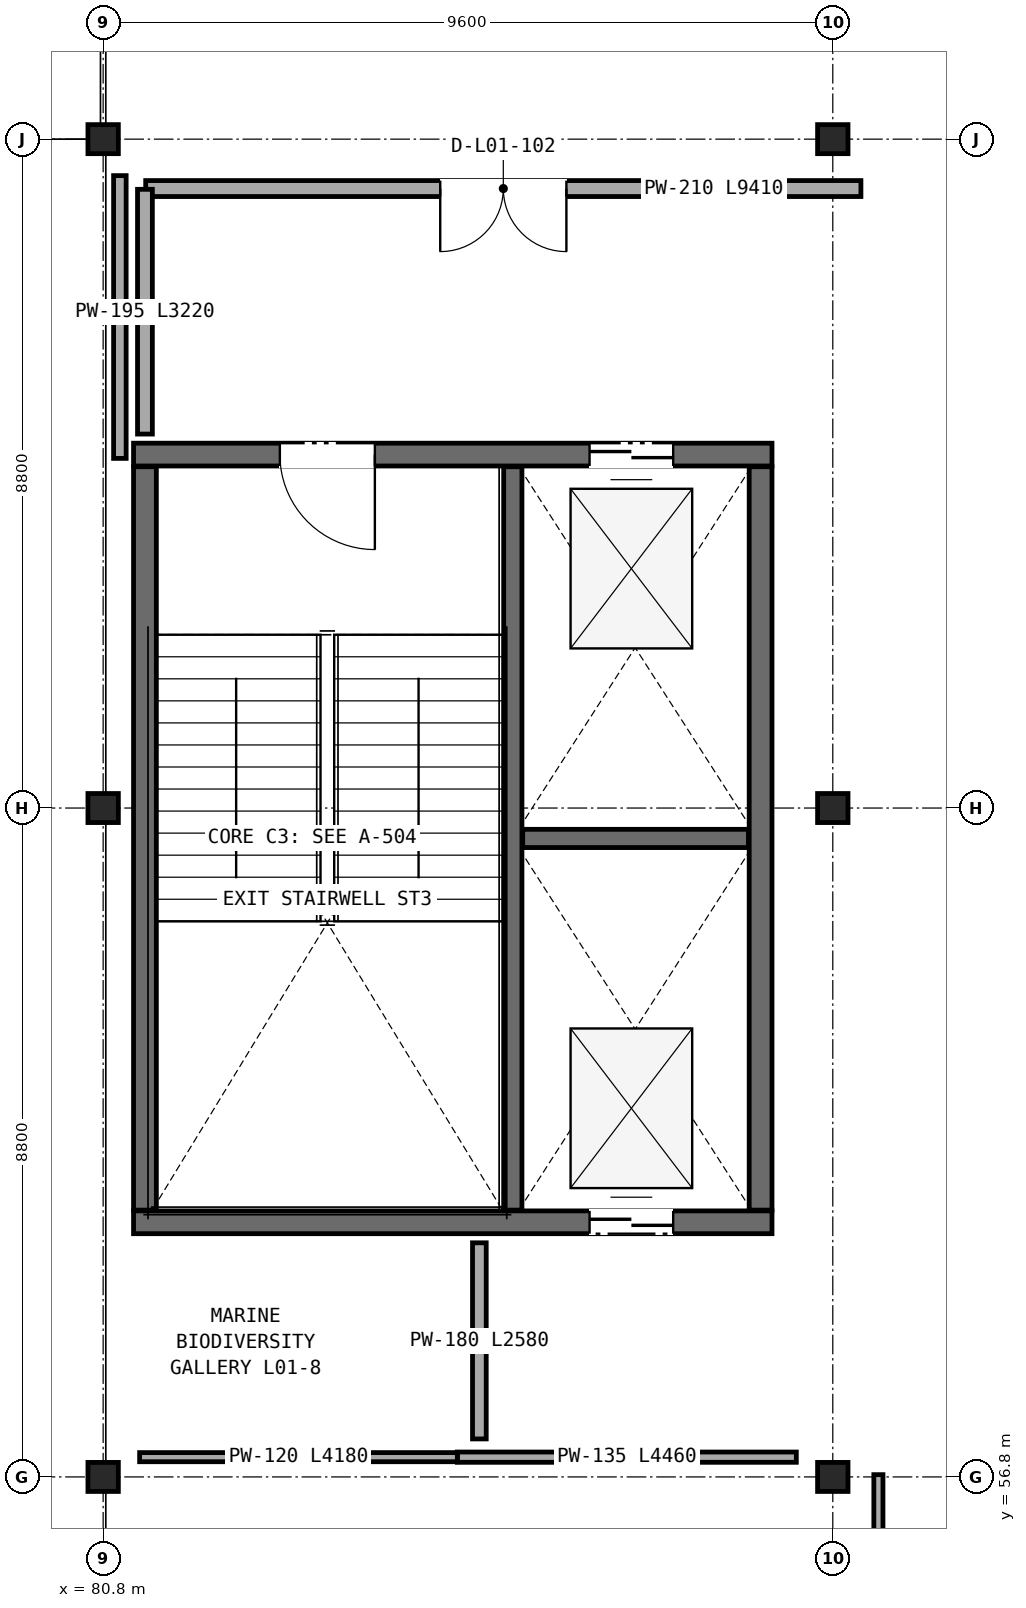
"""IFC4 building model, lengths in metres.
Left out: names, types, materials, properties, quantities, classifications, styles, units other than length and angle.
Written with IfcOpenShell. Run it as: python <this file> out.ifc"""

import sys

from ifc_helpers import new_model, si_unit, direction, frame, frame_2d, origin, origin_2d, place, context, subcontext, project, spatial, rectangle, i_section, extrude, element, fill, save


model = new_model("IFC4")
c1 = context("Model", 3, precision=1e-05, world=origin(), true_north=direction((0.0, 1.0)))
c2 = subcontext(c1, "Body", "Model", "MODEL_VIEW")
j1 = project(units=[si_unit("LENGTHUNIT", "METRE"), si_unit("PLANEANGLEUNIT", "RADIAN")], contexts=[c1])
p1 = place(None, origin())
s1 = spatial("IfcSite", under=j1, at=p1, CompositionType="ELEMENT")
p2 = place(p1, origin())
s2 = spatial("IfcBuilding", under=s1, at=p2, CompositionType="ELEMENT")
p3 = place(p2, frame((0.0, 0.0, 5.6)))
s3 = spatial("IfcBuildingStorey", under=s2, at=p3, CompositionType="ELEMENT", Elevation=5.6)
for number, where, z_axis, x_axis in (
    (1, (90.4, 56.8, 0.0), (0.0, 0.0, 1.0), (1.0, 0.0, 0.0)),
    (2, (90.4, 65.6, 0.0), (0.0, 0.0, 1.0), (1.0, 0.0, 0.0)),
    (3, (90.4, 74.4, 0.0), (0.0, 0.0, 1.0), (1.0, 0.0, 0.0)),
    (4, (80.8, 56.8, 0.0), (0.0, 0.0, 1.0), (1.0, 0.0, 0.0)),
    (5, (80.8, 65.6, 0.0), (0.0, 0.0, 1.0), (1.0, 0.0, 0.0)),
    (6, (80.8, 74.4, 0.0), (0.0, 0.0, 1.0), (1.0, 0.0, 0.0)),
):
    element("IfcColumn", number, at=place(p3, frame(where, z_axis=z_axis, x_axis=x_axis)), inside=s3, PredefinedType="COLUMN", context=c2, shape_type="SweptSolid", body=[
        extrude(i_section(OverallWidth=0.4, OverallDepth=0.382, WebThickness=0.025, FlangeThickness=0.036, at=origin_2d()), origin(), (0.0, 0.0, 1.0), 4.5),
    ])
p4 = place(p3, frame((81.2, 60.15, 0.0), z_axis=(0.0, 0.0, 1.0), x_axis=(1.0, 0.0, 0.0)))
e7 = element("IfcWall", 7, at=p4, inside=s3, PredefinedType="SHEAR", context=c2, shape_type="SweptSolid", body=[
    extrude(rectangle(XDim=8.4, YDim=0.3, at=frame_2d((4.2, 0.0))), origin(), (0.0, 0.0, 1.0), 4.245),
])
p5 = place(p4, frame((6.0, 0.0, 0.0)))
e8 = element("IfcOpeningElement", 8, at=p5, cuts=e7, PredefinedType="OPENING", context=c2, shape_type="SweptSolid", body=[
    extrude(rectangle(XDim=1.1, YDim=2.2, at=frame_2d((0.55, 1.1))), frame((0.0, 0.16, 0.0), z_axis=(0.0, -1.0, 0.0), x_axis=(1.0, 0.0, 0.0)), (0.0, 0.0, 1.0), 0.32),
])
p6 = place(p3, frame((89.6, 70.25, 0.0), z_axis=(0.0, 0.0, 1.0), x_axis=(-1.0, 0.0, 0.0)))
e9 = element("IfcWall", 9, at=p6, inside=s3, PredefinedType="SHEAR", context=c2, shape_type="SweptSolid", body=[
    extrude(rectangle(XDim=8.4, YDim=0.3, at=frame_2d((4.2, 0.0))), origin(), (0.0, 0.0, 1.0), 4.245),
])
p7 = place(p6, frame((5.225, 0.0, 0.0)))
e10 = element("IfcOpeningElement", 10, at=p7, cuts=e9, PredefinedType="OPENING", context=c2, shape_type="SweptSolid", body=[
    extrude(rectangle(XDim=1.25, YDim=2.2, at=frame_2d((0.625, 1.1))), frame((0.0, 0.16, 0.0), z_axis=(0.0, -1.0, 0.0), x_axis=(1.0, 0.0, 0.0)), (0.0, 0.0, 1.0), 0.32),
])
p8 = place(p6, frame((1.3, 0.0, 0.0)))
e11 = element("IfcOpeningElement", 11, at=p8, cuts=e9, PredefinedType="OPENING", context=c2, shape_type="SweptSolid", body=[
    extrude(rectangle(XDim=1.1, YDim=2.2, at=frame_2d((0.55, 1.1))), frame((0.0, 0.16, 0.0), z_axis=(0.0, -1.0, 0.0), x_axis=(1.0, 0.0, 0.0)), (0.0, 0.0, 1.0), 0.32),
])
for number, where, z_axis, x_axis in (
    (12, (89.45, 60.31, 0.0), (0.0, 0.0, 1.0), (0.0, 1.0, 0.0)),
    (13, (81.35, 70.09, 0.0), (0.0, 0.0, 1.0), (0.0, -1.0, 0.0)),
):
    element("IfcWall", number, at=place(p3, frame(where, z_axis=z_axis, x_axis=x_axis)), inside=s3, PredefinedType="SHEAR", context=c2, shape_type="SweptSolid", body=[
        extrude(rectangle(XDim=9.78, YDim=0.3, at=frame_2d((4.89, 0.0))), origin(), (0.0, 0.0, 1.0), 4.245),
    ])
p9 = place(p3, frame((86.19, 60.31, 0.0), z_axis=(0.0, 0.0, 1.0), x_axis=(0.0, 1.0, 0.0)))
e14 = element("IfcWall", 14, at=p9, inside=s3, PredefinedType="SOLIDWALL", context=c2, shape_type="SweptSolid", body=[
    extrude(rectangle(XDim=9.78, YDim=0.24, at=frame_2d((4.89, 0.0))), origin(), (0.0, 0.0, 1.0), 4.245),
])
p10 = place(p3, frame((86.32, 65.2, 0.0), z_axis=(0.0, 0.0, 1.0), x_axis=(1.0, 0.0, 0.0)))
e15 = element("IfcWall", 15, at=p10, inside=s3, PredefinedType="SOLIDWALL", context=c2, shape_type="SweptSolid", body=[
    extrude(rectangle(XDim=2.97, YDim=0.24, at=frame_2d((1.485, 0.0))), origin(), (0.0, 0.0, 1.0), 4.245),
])
p11 = place(p3, frame((85.46, 57.06, 0.0), z_axis=(0.0, 0.0, 1.0), x_axis=(1.0, 0.0, 0.0)))
e16 = element("IfcWall", 16, at=p11, inside=s3, PredefinedType="PARTITIONING", context=c2, shape_type="SweptSolid", body=[
    extrude(rectangle(XDim=4.46, YDim=0.135, at=frame_2d((2.23, 0.0))), origin(), (0.0, 0.0, 1.0), 3.613),
])
p12 = place(p3, frame((91.0, 56.83, 0.0), z_axis=(0.0, 0.0, 1.0), x_axis=(0.0, -1.0, 0.0)))
e17 = element("IfcWall", 17, at=p12, inside=s3, PredefinedType="PARTITIONING", context=c2, shape_type="SweptSolid", body=[
    extrude(rectangle(XDim=2.35, YDim=0.12, at=frame_2d((1.175, 0.0))), origin(), (0.0, 0.0, 1.0), 3.613),
])
p13 = place(p3, frame((90.77, 73.75, 0.0), z_axis=(0.0, 0.0, 1.0), x_axis=(-1.0, 0.0, 0.0)))
e18 = element("IfcWall", 18, at=p13, inside=s3, PredefinedType="PARTITIONING", context=c2, shape_type="SweptSolid", body=[
    extrude(rectangle(XDim=9.41, YDim=0.21, at=frame_2d((4.705, 0.0))), origin(), (0.0, 0.0, 1.0), 3.763),
])
p14 = place(p13, frame((3.875, 0.0, 0.0)))
e19 = element("IfcOpeningElement", 19, at=p14, cuts=e18, PredefinedType="OPENING", context=c2, shape_type="SweptSolid", body=[
    extrude(rectangle(XDim=1.66, YDim=2.34, at=frame_2d((0.83, 1.17))), frame((0.0, 0.115, 0.0), z_axis=(0.0, -1.0, 0.0), x_axis=(1.0, 0.0, 0.0)), (0.0, 0.0, 1.0), 0.23),
])
p15 = place(p3, frame((81.35, 73.74, 0.0), z_axis=(0.0, 0.0, 1.0), x_axis=(0.0, -1.0, 0.0)))
e20 = element("IfcWall", 20, at=p15, inside=s3, PredefinedType="PARTITIONING", context=c2, shape_type="SweptSolid", body=[
    extrude(rectangle(XDim=3.22, YDim=0.195, at=frame_2d((1.61, 0.0))), origin(), (0.0, 0.0, 1.0), 4.13),
])
p16 = place(p3, frame((85.75, 59.88, 0.0), z_axis=(0.0, 0.0, 1.0), x_axis=(0.0, -1.0, 0.0)))
e21 = element("IfcWall", 21, at=p16, inside=s3, PredefinedType="PARTITIONING", context=c2, shape_type="SweptSolid", body=[
    extrude(rectangle(XDim=2.58, YDim=0.18, at=frame_2d((1.29, 0.0))), origin(), (0.0, 0.0, 1.0), 4.13),
])
p17 = place(p3, frame((81.02, 70.2, 0.0), z_axis=(0.0, 0.0, 1.0), x_axis=(0.0, 1.0, 0.0)))
e22 = element("IfcWall", 22, at=p17, inside=s3, PredefinedType="PARTITIONING", context=c2, shape_type="SweptSolid", body=[
    extrude(rectangle(XDim=3.72, YDim=0.165, at=frame_2d((1.86, 0.0))), origin(), (0.0, 0.0, 1.0), 3.763),
])
p18 = place(p3, frame((81.28, 57.06, 0.0), z_axis=(0.0, 0.0, 1.0), x_axis=(1.0, 0.0, 0.0)))
e23 = element("IfcWall", 23, at=p18, inside=s3, PredefinedType="PARTITIONING", context=c2, shape_type="SweptSolid", body=[
    extrude(rectangle(XDim=4.18, YDim=0.12, at=frame_2d((2.09, 0.0))), origin(), (0.0, 0.0, 1.0), 3.613),
])
p19 = place(p7, origin())
e24 = element("IfcDoor", 24, at=p19, inside=s3, OperationType="SINGLE_SWING_LEFT", PredefinedType="DOOR", context=c2, shape_type="SweptSolid", body=[
    extrude(rectangle(XDim=1.25, YDim=2.2, at=frame_2d((0.625, 1.1))), frame((0.0, 0.025, 0.0), z_axis=(0.0, -1.0, 0.0), x_axis=(1.0, 0.0, 0.0)), (0.0, 0.0, 1.0), 0.05),
])
fill(e10, e24)
p20 = place(p5, origin())
e25 = element("IfcDoor", 25, at=p20, inside=s3, OperationType="DOUBLE_DOOR_SLIDING", PredefinedType="DOOR", context=c2, shape_type="SweptSolid", body=[
    extrude(rectangle(XDim=1.1, YDim=2.2, at=frame_2d((0.55, 1.1))), frame((0.0, 0.025, 0.0), z_axis=(0.0, -1.0, 0.0), x_axis=(1.0, 0.0, 0.0)), (0.0, 0.0, 1.0), 0.05),
])
fill(e8, e25)
p21 = place(p8, origin())
e26 = element("IfcDoor", 26, at=p21, inside=s3, OperationType="DOUBLE_DOOR_SLIDING", PredefinedType="DOOR", context=c2, shape_type="SweptSolid", body=[
    extrude(rectangle(XDim=1.1, YDim=2.2, at=frame_2d((0.55, 1.1))), frame((0.0, 0.025, 0.0), z_axis=(0.0, -1.0, 0.0), x_axis=(1.0, 0.0, 0.0)), (0.0, 0.0, 1.0), 0.05),
])
fill(e11, e26)
p22 = place(p14, origin())
e27 = element("IfcDoor", 27, at=p22, inside=s3, OperationType="DOUBLE_DOOR_SINGLE_SWING", PredefinedType="DOOR", context=c2, shape_type="SweptSolid", body=[
    extrude(rectangle(XDim=1.66, YDim=2.34, at=frame_2d((0.83, 1.17))), frame((0.0, 0.025, 0.0), z_axis=(0.0, -1.0, 0.0), x_axis=(1.0, 0.0, 0.0)), (0.0, 0.0, 1.0), 0.05),
])
fill(e19, e27)
save(model, sys.argv[1])
